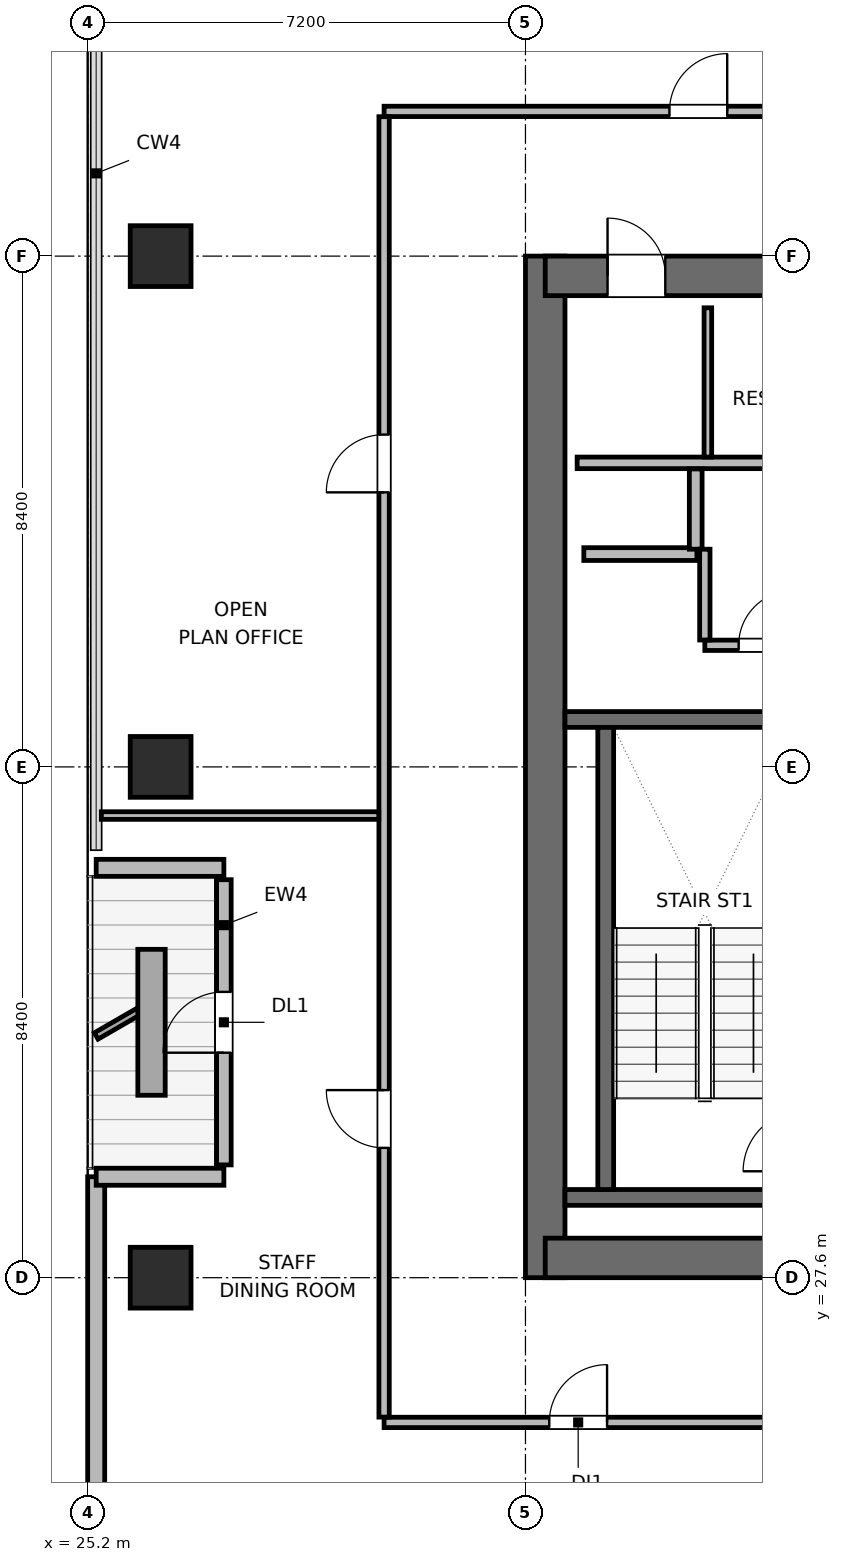
"""IFC4 building model, lengths in metres.
Left out: names, types, materials, properties, quantities, classifications, styles, units other than length and angle.
Written with IfcOpenShell. Run it as: python <this file> out.ifc"""

import sys

from ifc_helpers import new_model, si_unit, direction, frame, frame_2d, origin, origin_2d, place, context, subcontext, project, spatial, rectangle, extrude, element, fill, save


model = new_model("IFC4")
c1 = context("Model", 3, precision=1e-05, world=origin(), true_north=direction((0.0, 1.0)))
c2 = subcontext(c1, "Body", "Model", "MODEL_VIEW")
j1 = project(units=[si_unit("LENGTHUNIT", "METRE"), si_unit("PLANEANGLEUNIT", "RADIAN")], contexts=[c1])
p1 = place(None, origin())
s1 = spatial("IfcSite", under=j1, at=p1, CompositionType="ELEMENT")
p2 = place(p1, origin())
s2 = spatial("IfcBuilding", under=s1, at=p2, CompositionType="ELEMENT")
p3 = place(p2, frame((0.0, 0.0, 251.1)))
s3 = spatial("IfcBuildingStorey", under=s2, at=p3, CompositionType="ELEMENT", Elevation=251.1)
p4 = place(p3, frame((32.725, 27.6, 0.0), z_axis=(0.0, 0.0, 1.0), x_axis=(0.0, 1.0, 0.0)))
e1 = element("IfcWall", 1, at=p4, inside=s3, PredefinedType="SHEAR", context=c2, shape_type="SweptSolid", body=[
    extrude(rectangle(XDim=16.8, YDim=0.65, at=frame_2d((8.4, 0.0))), origin(), (0.0, 0.0, 1.0), 3.9),
])
p5 = place(p3, frame((32.725, 27.925, 0.0), z_axis=(0.0, 0.0, 1.0), x_axis=(1.0, 0.0, 0.0)))
e2 = element("IfcWall", 2, at=p5, inside=s3, PredefinedType="SHEAR", context=c2, shape_type="SweptSolid", body=[
    extrude(rectangle(XDim=9.35, YDim=0.65, at=frame_2d((4.675, 0.0))), origin(), (0.0, 0.0, 1.0), 3.9),
])
p6 = place(p5, frame((5.025, 0.0, 0.0)))
e3 = element("IfcOpeningElement", 3, at=p6, cuts=e2, PredefinedType="OPENING", context=c2, shape_type="SweptSolid", body=[
    extrude(rectangle(XDim=1.05, YDim=2.04, at=frame_2d((0.525, 1.02))), frame((0.0, 0.335, 0.0), z_axis=(0.0, -1.0, 0.0), x_axis=(1.0, 0.0, 0.0)), (0.0, 0.0, 1.0), 0.67),
])
p7 = place(p3, frame((32.725, 44.075, 0.0), z_axis=(0.0, 0.0, 1.0), x_axis=(1.0, 0.0, 0.0)))
e4 = element("IfcWall", 4, at=p7, inside=s3, PredefinedType="SHEAR", context=c2, shape_type="SweptSolid", body=[
    extrude(rectangle(XDim=9.35, YDim=0.65, at=frame_2d((4.675, 0.0))), origin(), (0.0, 0.0, 1.0), 3.9),
])
p8 = place(p7, frame((1.025, 0.0, 0.0)))
e5 = element("IfcOpeningElement", 5, at=p8, cuts=e4, PredefinedType="OPENING", context=c2, shape_type="SweptSolid", body=[
    extrude(rectangle(XDim=0.95, YDim=2.04, at=frame_2d((0.475, 1.02))), frame((0.0, 0.335, 0.0), z_axis=(0.0, -1.0, 0.0), x_axis=(1.0, 0.0, 0.0)), (0.0, 0.0, 1.0), 0.67),
])
p9 = place(p7, frame((4.275, 0.0, 0.0)))
e6 = element("IfcOpeningElement", 6, at=p9, cuts=e4, PredefinedType="OPENING", context=c2, shape_type="SweptSolid", body=[
    extrude(rectangle(XDim=0.9, YDim=2.02, at=frame_2d((0.45, 1.01))), frame((0.0, 0.335, 0.0), z_axis=(0.0, -1.0, 0.0), x_axis=(1.0, 0.0, 0.0)), (0.0, 0.0, 1.0), 0.67),
])
p10 = place(p7, frame((7.175, 0.0, 0.0)))
e7 = element("IfcOpeningElement", 7, at=p10, cuts=e4, PredefinedType="OPENING", context=c2, shape_type="SweptSolid", body=[
    extrude(rectangle(XDim=0.9, YDim=2.02, at=frame_2d((0.45, 1.01))), frame((0.0, 0.335, 0.0), z_axis=(0.0, -1.0, 0.0), x_axis=(1.0, 0.0, 0.0)), (0.0, 0.0, 1.0), 0.67),
])
for number, where, z_axis, x_axis in (
    (8, (33.05, 28.92, 0.0), (0.0, 0.0, 1.0), (1.0, 0.0, 0.0)),
    (9, (33.05, 36.78, 0.0), (0.0, 0.0, 1.0), (1.0, 0.0, 0.0)),
):
    element("IfcWall", number, at=place(p3, frame(where, z_axis=z_axis, x_axis=x_axis)), inside=s3, PredefinedType="SHEAR", context=c2, shape_type="SweptSolid", body=[
        extrude(rectangle(XDim=4.06, YDim=0.26, at=frame_2d((2.03, 0.0))), origin(), (0.0, 0.0, 1.0), 3.9),
    ])
p11 = place(p3, frame((33.72, 29.05, 0.0), z_axis=(0.0, 0.0, 1.0), x_axis=(0.0, 1.0, 0.0)))
e10 = element("IfcWall", 10, at=p11, inside=s3, PredefinedType="SHEAR", context=c2, shape_type="SweptSolid", body=[
    extrude(rectangle(XDim=7.6, YDim=0.26, at=frame_2d((3.8, 0.0))), origin(), (0.0, 0.0, 1.0), 3.9),
])
for number, where, z_axis, x_axis in (
    (11, (26.4, 27.6, 0.0), (0.0, 0.0, 1.0), (1.0, 0.0, 0.0)),
    (12, (26.4, 36.0, 0.0), (0.0, 0.0, 1.0), (1.0, 0.0, 0.0)),
    (13, (26.4, 44.4, 0.0), (0.0, 0.0, 1.0), (1.0, 0.0, 0.0)),
):
    element("IfcColumn", number, at=place(p3, frame(where, z_axis=z_axis, x_axis=x_axis)), inside=s3, PredefinedType="COLUMN", context=c2, shape_type="SweptSolid", body=[
        extrude(rectangle(XDim=1.0, YDim=1.0, at=origin_2d()), origin(), (0.0, 0.0, 1.0), 3.9),
    ])
p12 = place(p3, frame((25.34, 23.818, 0.0), z_axis=(0.0, 0.0, 1.0), x_axis=(0.0, 1.0, 0.0)))
e14 = element("IfcWall", 14, at=p12, inside=s3, PredefinedType="SOLIDWALL", context=c2, shape_type="SweptSolid", body=[
    extrude(rectangle(XDim=5.442, YDim=0.28, at=frame_2d((2.721, 0.0))), origin(), (0.0, 0.0, 1.0), 3.68),
])
p13 = place(p3, frame((25.34, 29.26, 0.0), z_axis=(0.0, 0.0, 1.0), x_axis=(1.0, 0.0, 0.0)))
e15 = element("IfcWall", 15, at=p13, inside=s3, PredefinedType="SOLIDWALL", context=c2, shape_type="SweptSolid", body=[
    extrude(rectangle(XDim=2.1, YDim=0.28, at=frame_2d((1.05, 0.0))), origin(), (0.0, 0.0, 1.0), 2.215),
])
p14 = place(p3, frame((27.44, 29.455, 0.0), z_axis=(0.0, 0.0, 1.0), x_axis=(0.0, 1.0, 0.0)))
e16 = element("IfcWall", 16, at=p14, inside=s3, PredefinedType="SOLIDWALL", context=c2, shape_type="SweptSolid", body=[
    extrude(rectangle(XDim=4.69, YDim=0.24, at=frame_2d((2.345, 0.0))), origin(), (0.0, 0.0, 1.0), 3.248),
])
p15 = place(p14, frame((1.845, 0.0, 0.0)))
e17 = element("IfcOpeningElement", 17, at=p15, cuts=e16, PredefinedType="OPENING", context=c2, shape_type="SweptSolid", body=[
    extrude(rectangle(XDim=1.0, YDim=2.02, at=frame_2d((0.5, 1.01))), frame((0.0, 0.13, 0.0), z_axis=(0.0, -1.0, 0.0), x_axis=(1.0, 0.0, 0.0)), (0.0, 0.0, 1.0), 0.26),
])
p16 = place(p3, frame((27.44, 34.34, 0.0), z_axis=(0.0, 0.0, 1.0), x_axis=(-1.0, 0.0, 0.0)))
e18 = element("IfcWall", 18, at=p16, inside=s3, PredefinedType="SOLIDWALL", context=c2, shape_type="SweptSolid", body=[
    extrude(rectangle(XDim=2.1, YDim=0.28, at=frame_2d((1.05, 0.0))), origin(), (0.0, 0.0, 1.0), 2.215),
])
p17 = place(p3, frame((33.25, 41.0, 0.0), z_axis=(0.0, 0.0, 1.0), x_axis=(1.0, 0.0, 0.0)))
e19 = element("IfcWall", 19, at=p17, inside=s3, PredefinedType="PLUMBINGWALL", context=c2, shape_type="SweptSolid", body=[
    extrude(rectangle(XDim=8.3, YDim=0.19, at=frame_2d((4.15, 0.0))), origin(), (0.0, 0.0, 1.0), 3.68),
])
p18 = place(p3, frame((35.4, 41.095, 0.0), z_axis=(0.0, 0.0, 1.0), x_axis=(0.0, 1.0, 0.0)))
e20 = element("IfcWall", 20, at=p18, inside=s3, PredefinedType="PARTITIONING", context=c2, shape_type="SweptSolid", body=[
    extrude(rectangle(XDim=2.455, YDim=0.125, at=frame_2d((1.228, 0.0))), origin(), (0.0, 0.0, 1.0), 3.68),
])
p19 = place(p3, frame((33.36, 39.5, 0.0), z_axis=(0.0, 0.0, 1.0), x_axis=(1.0, 0.0, 0.0)))
e21 = element("IfcWall", 21, at=p19, inside=s3, PredefinedType="PARTITIONING", context=c2, shape_type="SweptSolid", body=[
    extrude(rectangle(XDim=1.86, YDim=0.21, at=frame_2d((0.93, 0.0))), origin(), (0.0, 0.0, 1.0), 3.68),
])
p20 = place(p3, frame((35.2, 39.58, 0.0), z_axis=(0.0, 0.0, 1.0), x_axis=(0.0, 1.0, 0.0)))
e22 = element("IfcWall", 22, at=p20, inside=s3, PredefinedType="PARTITIONING", context=c2, shape_type="SweptSolid", body=[
    extrude(rectangle(XDim=1.32, YDim=0.21, at=frame_2d((0.66, 0.0))), origin(), (0.0, 0.0, 1.0), 3.68),
])
p21 = place(p3, frame((35.35, 38.0, 0.0), z_axis=(0.0, 0.0, 1.0), x_axis=(1.0, 0.0, 0.0)))
e23 = element("IfcWall", 23, at=p21, inside=s3, PredefinedType="PARTITIONING", context=c2, shape_type="SweptSolid", body=[
    extrude(rectangle(XDim=6.1, YDim=0.17, at=frame_2d((3.05, 0.0))), origin(), (0.0, 0.0, 1.0), 3.68),
])
p22 = place(p21, frame((0.556, 0.0, 0.0)))
e24 = element("IfcOpeningElement", 24, at=p22, cuts=e23, PredefinedType="OPENING", context=c2, shape_type="SweptSolid", body=[
    extrude(rectangle(XDim=0.9, YDim=2.02, at=frame_2d((0.45, 1.01))), frame((0.0, 0.095, 0.0), z_axis=(0.0, -1.0, 0.0), x_axis=(1.0, 0.0, 0.0)), (0.0, 0.0, 1.0), 0.19),
])
p23 = place(p21, frame((2.6, 0.0, 0.0)))
e25 = element("IfcOpeningElement", 25, at=p23, cuts=e23, PredefinedType="OPENING", context=c2, shape_type="SweptSolid", body=[
    extrude(rectangle(XDim=0.9, YDim=2.02, at=frame_2d((0.45, 1.01))), frame((0.0, 0.095, 0.0), z_axis=(0.0, -1.0, 0.0), x_axis=(1.0, 0.0, 0.0)), (0.0, 0.0, 1.0), 0.19),
])
p24 = place(p21, frame((4.643, 0.0, 0.0)))
e26 = element("IfcOpeningElement", 26, at=p24, cuts=e23, PredefinedType="OPENING", context=c2, shape_type="SweptSolid", body=[
    extrude(rectangle(XDim=0.9, YDim=2.02, at=frame_2d((0.45, 1.01))), frame((0.0, 0.095, 0.0), z_axis=(0.0, -1.0, 0.0), x_axis=(1.0, 0.0, 0.0)), (0.0, 0.0, 1.0), 0.19),
])
p25 = place(p3, frame((35.35, 38.087, 0.0), z_axis=(0.0, 0.0, 1.0), x_axis=(0.0, 1.0, 0.0)))
e27 = element("IfcWall", 27, at=p25, inside=s3, PredefinedType="PARTITIONING", context=c2, shape_type="SweptSolid", body=[
    extrude(rectangle(XDim=1.493, YDim=0.17, at=frame_2d((0.747, 0.0))), origin(), (0.0, 0.0, 1.0), 3.68),
])
p26 = place(p3, frame((30.075, 25.22, 0.0), z_axis=(0.0, 0.0, 1.0), x_axis=(1.0, 0.0, 0.0)))
e28 = element("IfcWall", 28, at=p26, inside=s3, PredefinedType="PARTITIONING", context=c2, shape_type="SweptSolid", body=[
    extrude(rectangle(XDim=33.525, YDim=0.17, at=frame_2d((16.763, 0.0))), origin(), (0.0, 0.0, 1.0), 3.68),
])
p27 = place(p26, frame((2.717, 0.0, 0.0)))
e29 = element("IfcOpeningElement", 29, at=p27, cuts=e28, PredefinedType="OPENING", context=c2, shape_type="SweptSolid", body=[
    extrude(rectangle(XDim=0.95, YDim=2.04, at=frame_2d((0.475, 1.02))), frame((0.0, 0.095, 0.0), z_axis=(0.0, -1.0, 0.0), x_axis=(1.0, 0.0, 0.0)), (0.0, 0.0, 1.0), 0.19),
])
p28 = place(p26, frame((8.505, 0.0, 0.0)))
e30 = element("IfcOpeningElement", 30, at=p28, cuts=e28, PredefinedType="OPENING", context=c2, shape_type="SweptSolid", body=[
    extrude(rectangle(XDim=0.95, YDim=2.04, at=frame_2d((0.475, 1.02))), frame((0.0, 0.095, 0.0), z_axis=(0.0, -1.0, 0.0), x_axis=(1.0, 0.0, 0.0)), (0.0, 0.0, 1.0), 0.19),
])
p29 = place(p26, frame((13.695, 0.0, 0.0)))
e31 = element("IfcOpeningElement", 31, at=p29, cuts=e28, PredefinedType="OPENING", context=c2, shape_type="SweptSolid", body=[
    extrude(rectangle(XDim=0.95, YDim=2.04, at=frame_2d((0.475, 1.02))), frame((0.0, 0.095, 0.0), z_axis=(0.0, -1.0, 0.0), x_axis=(1.0, 0.0, 0.0)), (0.0, 0.0, 1.0), 0.19),
])
p30 = place(p26, frame((18.88, 0.0, 0.0)))
e32 = element("IfcOpeningElement", 32, at=p30, cuts=e28, PredefinedType="OPENING", context=c2, shape_type="SweptSolid", body=[
    extrude(rectangle(XDim=0.95, YDim=2.04, at=frame_2d((0.475, 1.02))), frame((0.0, 0.095, 0.0), z_axis=(0.0, -1.0, 0.0), x_axis=(1.0, 0.0, 0.0)), (0.0, 0.0, 1.0), 0.19),
])
p31 = place(p26, frame((24.065, 0.0, 0.0)))
e33 = element("IfcOpeningElement", 33, at=p31, cuts=e28, PredefinedType="OPENING", context=c2, shape_type="SweptSolid", body=[
    extrude(rectangle(XDim=0.95, YDim=2.04, at=frame_2d((0.475, 1.02))), frame((0.0, 0.095, 0.0), z_axis=(0.0, -1.0, 0.0), x_axis=(1.0, 0.0, 0.0)), (0.0, 0.0, 1.0), 0.19),
])
p32 = place(p26, frame((29.855, 0.0, 0.0)))
e34 = element("IfcOpeningElement", 34, at=p32, cuts=e28, PredefinedType="OPENING", context=c2, shape_type="SweptSolid", body=[
    extrude(rectangle(XDim=0.95, YDim=2.04, at=frame_2d((0.475, 1.02))), frame((0.0, 0.095, 0.0), z_axis=(0.0, -1.0, 0.0), x_axis=(1.0, 0.0, 0.0)), (0.0, 0.0, 1.0), 0.19),
])
p33 = place(p3, frame((30.075, 46.78, 0.0), z_axis=(0.0, 0.0, 1.0), x_axis=(1.0, 0.0, 0.0)))
e35 = element("IfcWall", 35, at=p33, inside=s3, PredefinedType="PARTITIONING", context=c2, shape_type="SweptSolid", body=[
    extrude(rectangle(XDim=33.525, YDim=0.17, at=frame_2d((16.763, 0.0))), origin(), (0.0, 0.0, 1.0), 3.68),
])
p34 = place(p33, frame((4.693, 0.0, 0.0)))
e36 = element("IfcOpeningElement", 36, at=p34, cuts=e35, PredefinedType="OPENING", context=c2, shape_type="SweptSolid", body=[
    extrude(rectangle(XDim=0.95, YDim=2.04, at=frame_2d((0.475, 1.02))), frame((0.0, 0.095, 0.0), z_axis=(0.0, -1.0, 0.0), x_axis=(1.0, 0.0, 0.0)), (0.0, 0.0, 1.0), 0.19),
])
p35 = place(p33, frame((11.725, 0.0, 0.0)))
e37 = element("IfcOpeningElement", 37, at=p35, cuts=e35, PredefinedType="OPENING", context=c2, shape_type="SweptSolid", body=[
    extrude(rectangle(XDim=0.95, YDim=2.04, at=frame_2d((0.475, 1.02))), frame((0.0, 0.095, 0.0), z_axis=(0.0, -1.0, 0.0), x_axis=(1.0, 0.0, 0.0)), (0.0, 0.0, 1.0), 0.19),
])
p36 = place(p33, frame((19.505, 0.0, 0.0)))
e38 = element("IfcOpeningElement", 38, at=p36, cuts=e35, PredefinedType="OPENING", context=c2, shape_type="SweptSolid", body=[
    extrude(rectangle(XDim=0.95, YDim=2.04, at=frame_2d((0.475, 1.02))), frame((0.0, 0.095, 0.0), z_axis=(0.0, -1.0, 0.0), x_axis=(1.0, 0.0, 0.0)), (0.0, 0.0, 1.0), 0.19),
])
p37 = place(p33, frame((29.235, 0.0, 0.0)))
e39 = element("IfcOpeningElement", 39, at=p37, cuts=e35, PredefinedType="OPENING", context=c2, shape_type="SweptSolid", body=[
    extrude(rectangle(XDim=0.95, YDim=2.04, at=frame_2d((0.475, 1.02))), frame((0.0, 0.095, 0.0), z_axis=(0.0, -1.0, 0.0), x_axis=(1.0, 0.0, 0.0)), (0.0, 0.0, 1.0), 0.19),
])
p38 = place(p3, frame((30.075, 25.307, 0.0), z_axis=(0.0, 0.0, 1.0), x_axis=(0.0, 1.0, 0.0)))
e40 = element("IfcWall", 40, at=p38, inside=s3, PredefinedType="PARTITIONING", context=c2, shape_type="SweptSolid", body=[
    extrude(rectangle(XDim=21.386, YDim=0.17, at=frame_2d((10.693, 0.0))), origin(), (0.0, 0.0, 1.0), 3.68),
])
p39 = place(p38, frame((4.428, 0.0, 0.0)))
e41 = element("IfcOpeningElement", 41, at=p39, cuts=e40, PredefinedType="OPENING", context=c2, shape_type="SweptSolid", body=[
    extrude(rectangle(XDim=0.95, YDim=2.04, at=frame_2d((0.475, 1.02))), frame((0.0, 0.095, 0.0), z_axis=(0.0, -1.0, 0.0), x_axis=(1.0, 0.0, 0.0)), (0.0, 0.0, 1.0), 0.19),
])
p40 = place(p38, frame((15.208, 0.0, 0.0)))
e42 = element("IfcOpeningElement", 42, at=p40, cuts=e40, PredefinedType="OPENING", context=c2, shape_type="SweptSolid", body=[
    extrude(rectangle(XDim=0.95, YDim=2.04, at=frame_2d((0.475, 1.02))), frame((0.0, 0.095, 0.0), z_axis=(0.0, -1.0, 0.0), x_axis=(1.0, 0.0, 0.0)), (0.0, 0.0, 1.0), 0.19),
])
p41 = place(p3, frame((25.425, 35.2, 0.0), z_axis=(0.0, 0.0, 1.0), x_axis=(1.0, 0.0, 0.0)))
e43 = element("IfcWall", 43, at=p41, inside=s3, PredefinedType="PARTITIONING", context=c2, shape_type="SweptSolid", body=[
    extrude(rectangle(XDim=4.563, YDim=0.125, at=frame_2d((2.281, 0.0))), origin(), (0.0, 0.0, 1.0), 3.68),
])
p42 = place(p15, origin())
e44 = element("IfcDoor", 44, at=p42, inside=s3, OperationType="SINGLE_SWING_LEFT", PredefinedType="DOOR", context=c2, shape_type="SweptSolid", body=[
    extrude(rectangle(XDim=1.0, YDim=2.02, at=frame_2d((0.5, 1.01))), frame((0.0, 0.025, 0.0), z_axis=(0.0, -1.0, 0.0), x_axis=(1.0, 0.0, 0.0)), (0.0, 0.0, 1.0), 0.05),
])
fill(e17, e44)
p43 = place(p8, origin())
e45 = element("IfcDoor", 45, at=p43, inside=s3, OperationType="SINGLE_SWING_LEFT", PredefinedType="DOOR", context=c2, shape_type="SweptSolid", body=[
    extrude(rectangle(XDim=0.95, YDim=2.04, at=frame_2d((0.475, 1.02))), frame((0.0, 0.025, 0.0), z_axis=(0.0, -1.0, 0.0), x_axis=(1.0, 0.0, 0.0)), (0.0, 0.0, 1.0), 0.05),
])
fill(e5, e45)
p44 = place(p22, origin())
e46 = element("IfcDoor", 46, at=p44, inside=s3, OperationType="SINGLE_SWING_RIGHT", PredefinedType="DOOR", context=c2, shape_type="SweptSolid", body=[
    extrude(rectangle(XDim=0.9, YDim=2.02, at=frame_2d((0.45, 1.01))), frame((0.0, 0.025, 0.0), z_axis=(0.0, -1.0, 0.0), x_axis=(1.0, 0.0, 0.0)), (0.0, 0.0, 1.0), 0.05),
])
fill(e24, e46)
p45 = place(p27, origin())
e47 = element("IfcDoor", 47, at=p45, inside=s3, OperationType="SINGLE_SWING_RIGHT", PredefinedType="DOOR", context=c2, shape_type="SweptSolid", body=[
    extrude(rectangle(XDim=0.95, YDim=2.04, at=frame_2d((0.475, 1.02))), frame((0.0, 0.025, 0.0), z_axis=(0.0, -1.0, 0.0), x_axis=(1.0, 0.0, 0.0)), (0.0, 0.0, 1.0), 0.05),
])
fill(e29, e47)
p46 = place(p34, origin())
e48 = element("IfcDoor", 48, at=p46, inside=s3, OperationType="SINGLE_SWING_RIGHT", PredefinedType="DOOR", context=c2, shape_type="SweptSolid", body=[
    extrude(rectangle(XDim=0.95, YDim=2.04, at=frame_2d((0.475, 1.02))), frame((0.0, 0.025, 0.0), z_axis=(0.0, -1.0, 0.0), x_axis=(1.0, 0.0, 0.0)), (0.0, 0.0, 1.0), 0.05),
])
fill(e36, e48)
p47 = place(p39, origin())
e49 = element("IfcDoor", 49, at=p47, inside=s3, OperationType="SINGLE_SWING_RIGHT", PredefinedType="DOOR", context=c2, shape_type="SweptSolid", body=[
    extrude(rectangle(XDim=0.95, YDim=2.04, at=frame_2d((0.475, 1.02))), frame((0.0, 0.025, 0.0), z_axis=(0.0, -1.0, 0.0), x_axis=(1.0, 0.0, 0.0)), (0.0, 0.0, 1.0), 0.05),
])
fill(e41, e49)
p48 = place(p40, origin())
e50 = element("IfcDoor", 50, at=p48, inside=s3, OperationType="SINGLE_SWING_LEFT", PredefinedType="DOOR", context=c2, shape_type="SweptSolid", body=[
    extrude(rectangle(XDim=0.95, YDim=2.04, at=frame_2d((0.475, 1.02))), frame((0.0, 0.025, 0.0), z_axis=(0.0, -1.0, 0.0), x_axis=(1.0, 0.0, 0.0)), (0.0, 0.0, 1.0), 0.05),
])
fill(e42, e50)
save(model, sys.argv[1])
